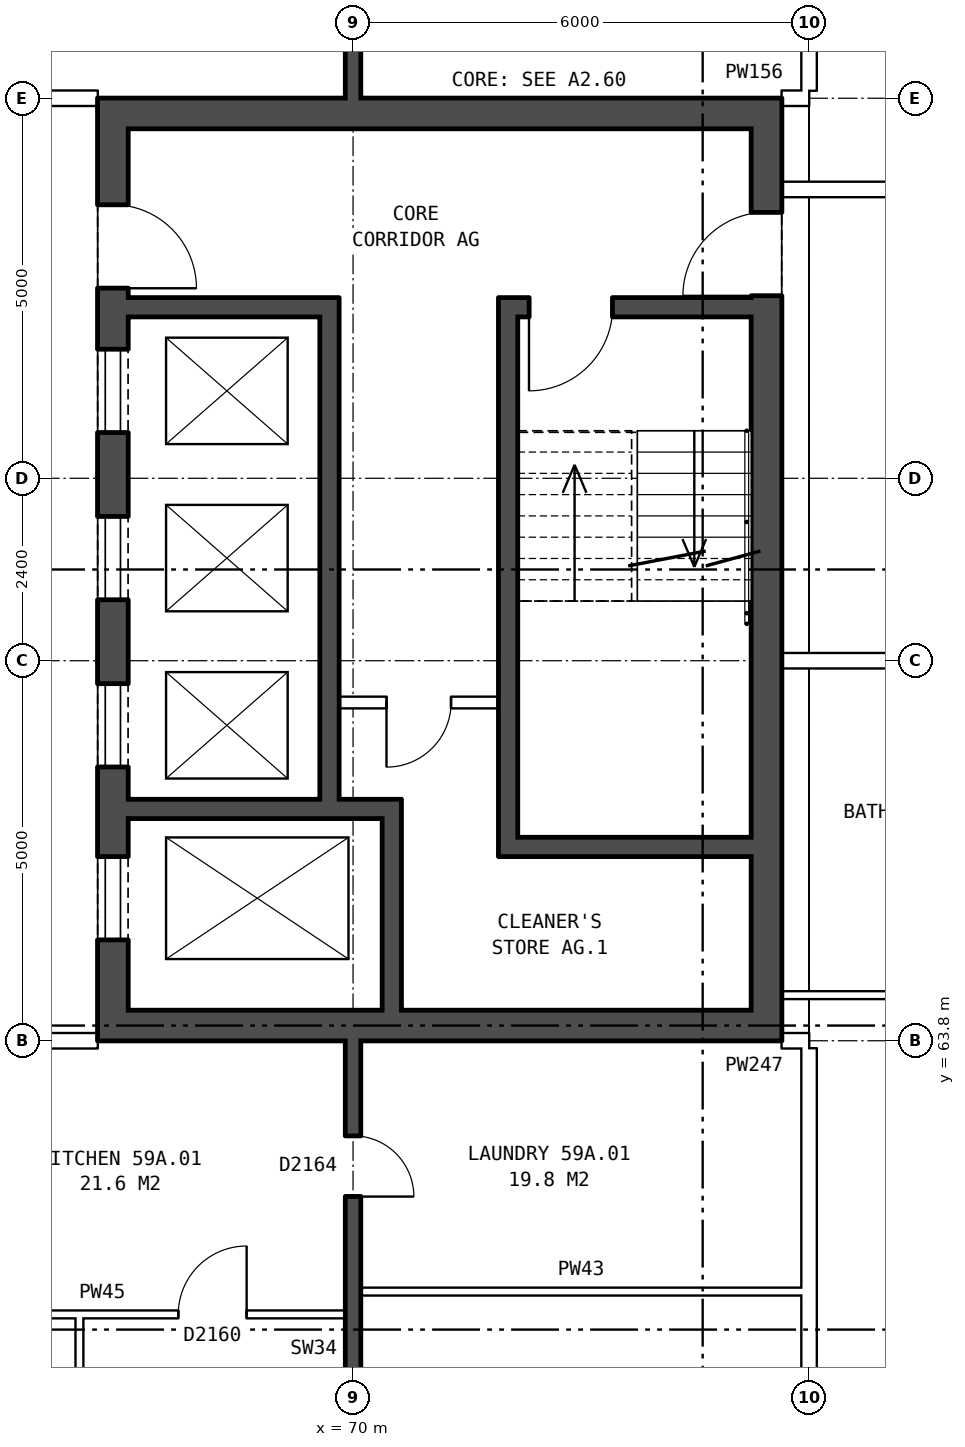
"""IFC4 building model, lengths in metres.
Left out: names, types, materials, properties, quantities, classifications, styles, units other than length and angle.
Written with IfcOpenShell. Run it as: python <this file> out.ifc"""

import sys

from ifc_helpers import new_model, si_unit, direction, frame, frame_2d, origin, place, context, subcontext, project, spatial, rectangle, extrude, element, fill, save


model = new_model("IFC4")
c1 = context("Model", 3, precision=1e-05, world=origin(), true_north=direction((0.0, 1.0)))
c2 = subcontext(c1, "Body", "Model", "MODEL_VIEW")
j1 = project(units=[si_unit("LENGTHUNIT", "METRE"), si_unit("PLANEANGLEUNIT", "RADIAN")], contexts=[c1])
p1 = place(None, origin())
s1 = spatial("IfcSite", under=j1, at=p1, CompositionType="ELEMENT")
p2 = place(p1, origin())
s2 = spatial("IfcBuilding", under=s1, at=p2, CompositionType="ELEMENT")
p3 = place(p2, frame((0.0, 0.0, 209.0)))
s3 = spatial("IfcBuildingStorey", under=s2, at=p3, CompositionType="ELEMENT", Elevation=209.0)
p4 = place(p3, frame((66.84, 63.8, 0.0), z_axis=(0.0, 0.0, 1.0), x_axis=(0.0, 1.0, 0.0)))
e1 = element("IfcWall", 1, at=p4, inside=s3, PredefinedType="SHEAR", context=c2, shape_type="SweptSolid", body=[
    extrude(rectangle(XDim=12.4, YDim=0.4, at=frame_2d((6.2, 0.0))), origin(), (0.0, 0.0, 1.0), 2.85),
])
p5 = place(p4, frame((1.325, 0.0, 0.0)))
e2 = element("IfcOpeningElement", 2, at=p5, cuts=e1, PredefinedType="OPENING", context=c2, shape_type="SweptSolid", body=[
    extrude(rectangle(XDim=1.1, YDim=2.1, at=frame_2d((0.55, 1.05))), frame((0.0, 0.21, 0.0), z_axis=(0.0, -1.0, 0.0), x_axis=(1.0, 0.0, 0.0)), (0.0, 0.0, 1.0), 0.42),
])
p6 = place(p4, frame((3.6, 0.0, 0.0)))
e3 = element("IfcOpeningElement", 3, at=p6, cuts=e1, PredefinedType="OPENING", context=c2, shape_type="SweptSolid", body=[
    extrude(rectangle(XDim=1.1, YDim=2.1, at=frame_2d((0.55, 1.05))), frame((0.0, 0.21, 0.0), z_axis=(0.0, -1.0, 0.0), x_axis=(1.0, 0.0, 0.0)), (0.0, 0.0, 1.0), 0.42),
])
p7 = place(p4, frame((5.8, 0.0, 0.0)))
e4 = element("IfcOpeningElement", 4, at=p7, cuts=e1, PredefinedType="OPENING", context=c2, shape_type="SweptSolid", body=[
    extrude(rectangle(XDim=1.1, YDim=2.1, at=frame_2d((0.55, 1.05))), frame((0.0, 0.21, 0.0), z_axis=(0.0, -1.0, 0.0), x_axis=(1.0, 0.0, 0.0)), (0.0, 0.0, 1.0), 0.42),
])
p8 = place(p4, frame((8.0, 0.0, 0.0)))
e5 = element("IfcOpeningElement", 5, at=p8, cuts=e1, PredefinedType="OPENING", context=c2, shape_type="SweptSolid", body=[
    extrude(rectangle(XDim=1.1, YDim=2.1, at=frame_2d((0.55, 1.05))), frame((0.0, 0.21, 0.0), z_axis=(0.0, -1.0, 0.0), x_axis=(1.0, 0.0, 0.0)), (0.0, 0.0, 1.0), 0.42),
])
p9 = place(p4, frame((9.9, 0.0, 0.0)))
e6 = element("IfcOpeningElement", 6, at=p9, cuts=e1, PredefinedType="OPENING", context=c2, shape_type="SweptSolid", body=[
    extrude(rectangle(XDim=1.1, YDim=2.1, at=frame_2d((0.55, 1.05))), frame((0.0, 0.21, 0.0), z_axis=(0.0, -1.0, 0.0), x_axis=(1.0, 0.0, 0.0)), (0.0, 0.0, 1.0), 0.42),
])
p10 = place(p3, frame((75.44, 63.8, 0.0), z_axis=(0.0, 0.0, 1.0), x_axis=(0.0, 1.0, 0.0)))
e7 = element("IfcWall", 7, at=p10, inside=s3, PredefinedType="SHEAR", context=c2, shape_type="SweptSolid", body=[
    extrude(rectangle(XDim=12.4, YDim=0.4, at=frame_2d((6.2, 0.0))), origin(), (0.0, 0.0, 1.0), 2.85),
])
p11 = place(p10, frame((9.8, 0.0, 0.0)))
e8 = element("IfcOpeningElement", 8, at=p11, cuts=e7, PredefinedType="OPENING", context=c2, shape_type="SweptSolid", body=[
    extrude(rectangle(XDim=1.1, YDim=2.1, at=frame_2d((0.55, 1.05))), frame((0.0, 0.21, 0.0), z_axis=(0.0, -1.0, 0.0), x_axis=(1.0, 0.0, 0.0)), (0.0, 0.0, 1.0), 0.42),
])
for number, where, z_axis, x_axis in (
    (9, (67.04, 64.0, 0.0), (0.0, 0.0, 1.0), (1.0, 0.0, 0.0)),
    (10, (67.04, 76.0, 0.0), (0.0, 0.0, 1.0), (1.0, 0.0, 0.0)),
):
    element("IfcWall", number, at=place(p3, frame(where, z_axis=z_axis, x_axis=x_axis)), inside=s3, PredefinedType="SHEAR", context=c2, shape_type="SweptSolid", body=[
        extrude(rectangle(XDim=8.2, YDim=0.4, at=frame_2d((4.1, 0.0))), origin(), (0.0, 0.0, 1.0), 2.85),
    ])
p12 = place(p3, frame((72.165, 66.35, 0.0), z_axis=(0.0, 0.0, 1.0), x_axis=(1.0, 0.0, 0.0)))
e11 = element("IfcWall", 11, at=p12, inside=s3, PredefinedType="SHEAR", context=c2, shape_type="SweptSolid", body=[
    extrude(rectangle(XDim=3.075, YDim=0.25, at=frame_2d((1.538, 0.0))), origin(), (0.0, 0.0, 1.0), 2.85),
])
p13 = place(p3, frame((67.04, 66.85, 0.0), z_axis=(0.0, 0.0, 1.0), x_axis=(1.0, 0.0, 0.0)))
e12 = element("IfcWall", 12, at=p13, inside=s3, PredefinedType="SHEAR", context=c2, shape_type="SweptSolid", body=[
    extrude(rectangle(XDim=3.595, YDim=0.25, at=frame_2d((1.797, 0.0))), origin(), (0.0, 0.0, 1.0), 2.85),
])
p14 = place(p3, frame((69.815, 68.25, 0.0), z_axis=(0.0, 0.0, 1.0), x_axis=(1.0, 0.0, 0.0)))
e13 = element("IfcWall", 13, at=p14, inside=s3, PredefinedType="PARTITIONING", context=c2, shape_type="SweptSolid", body=[
    extrude(rectangle(XDim=2.1, YDim=0.15, at=frame_2d((1.05, 0.0))), origin(), (0.0, 0.0, 1.0), 2.85),
])
p15 = place(p14, frame((0.625, 0.0, 0.0)))
e14 = element("IfcOpeningElement", 14, at=p15, cuts=e13, PredefinedType="OPENING", context=c2, shape_type="SweptSolid", body=[
    extrude(rectangle(XDim=0.85, YDim=2.1, at=frame_2d((0.425, 1.05))), frame((0.0, 0.085, 0.0), z_axis=(0.0, -1.0, 0.0), x_axis=(1.0, 0.0, 0.0)), (0.0, 0.0, 1.0), 0.17),
])
p16 = place(p3, frame((67.04, 73.45, 0.0), z_axis=(0.0, 0.0, 1.0), x_axis=(1.0, 0.0, 0.0)))
e15 = element("IfcWall", 15, at=p16, inside=s3, PredefinedType="SHEAR", context=c2, shape_type="SweptSolid", body=[
    extrude(rectangle(XDim=2.525, YDim=0.25, at=frame_2d((1.262, 0.0))), origin(), (0.0, 0.0, 1.0), 2.85),
])
p17 = place(p3, frame((72.165, 73.45, 0.0), z_axis=(0.0, 0.0, 1.0), x_axis=(1.0, 0.0, 0.0)))
e16 = element("IfcWall", 16, at=p17, inside=s3, PredefinedType="SHEAR", context=c2, shape_type="SweptSolid", body=[
    extrude(rectangle(XDim=3.075, YDim=0.25, at=frame_2d((1.538, 0.0))), origin(), (0.0, 0.0, 1.0), 2.85),
])
p18 = place(p17, frame((0.15, 0.0, 0.0)))
e17 = element("IfcOpeningElement", 17, at=p18, cuts=e16, PredefinedType="OPENING", context=c2, shape_type="SweptSolid", body=[
    extrude(rectangle(XDim=1.1, YDim=2.1, at=frame_2d((0.55, 1.05))), frame((0.0, 0.135, 0.0), z_axis=(0.0, -1.0, 0.0), x_axis=(1.0, 0.0, 0.0)), (0.0, 0.0, 1.0), 0.27),
])
p19 = place(p3, frame((69.69, 66.975, 0.0), z_axis=(0.0, 0.0, 1.0), x_axis=(0.0, 1.0, 0.0)))
e18 = element("IfcWall", 18, at=p19, inside=s3, PredefinedType="SHEAR", context=c2, shape_type="SweptSolid", body=[
    extrude(rectangle(XDim=6.6, YDim=0.25, at=frame_2d((3.3, 0.0))), origin(), (0.0, 0.0, 1.0), 2.85),
])
p20 = place(p3, frame((70.51, 64.2, 0.0), z_axis=(0.0, 0.0, 1.0), x_axis=(0.0, 1.0, 0.0)))
e19 = element("IfcWall", 19, at=p20, inside=s3, PredefinedType="SHEAR", context=c2, shape_type="SweptSolid", body=[
    extrude(rectangle(XDim=2.525, YDim=0.25, at=frame_2d((1.263, 0.0))), origin(), (0.0, 0.0, 1.0), 2.85),
])
p21 = place(p3, frame((72.04, 66.225, 0.0), z_axis=(0.0, 0.0, 1.0), x_axis=(0.0, 1.0, 0.0)))
e20 = element("IfcWall", 20, at=p21, inside=s3, PredefinedType="SHEAR", context=c2, shape_type="SweptSolid", body=[
    extrude(rectangle(XDim=7.35, YDim=0.25, at=frame_2d((3.675, 0.0))), origin(), (0.0, 0.0, 1.0), 2.85),
])
p22 = place(p3, frame((64.1, 60.2, 0.0), z_axis=(0.0, 0.0, 1.0), x_axis=(1.0, 0.0, 0.0)))
e21 = element("IfcWall", 21, at=p22, inside=s3, PredefinedType="PARTITIONING", context=c2, shape_type="SweptSolid", body=[
    extrude(rectangle(XDim=5.8, YDim=0.1, at=frame_2d((2.9, 0.0))), origin(), (0.0, 0.0, 1.0), 2.85),
])
p23 = place(p22, frame((3.6, 0.0, 0.0)))
e22 = element("IfcOpeningElement", 22, at=p23, cuts=e21, PredefinedType="OPENING", context=c2, shape_type="SweptSolid", body=[
    extrude(rectangle(XDim=0.9, YDim=2.1, at=frame_2d((0.45, 1.05))), frame((0.0, 0.06, 0.0), z_axis=(0.0, -1.0, 0.0), x_axis=(1.0, 0.0, 0.0)), (0.0, 0.0, 1.0), 0.12),
])
p24 = place(p22, frame((0.7, 0.0, 0.0)))
e23 = element("IfcOpeningElement", 23, at=p24, cuts=e21, PredefinedType="OPENING", context=c2, shape_type="SweptSolid", body=[
    extrude(rectangle(XDim=0.9, YDim=2.1, at=frame_2d((0.45, 1.05))), frame((0.0, 0.06, 0.0), z_axis=(0.0, -1.0, 0.0), x_axis=(1.0, 0.0, 0.0)), (0.0, 0.0, 1.0), 0.12),
])
p25 = place(p3, frame((70.1, 60.5, 0.0), z_axis=(0.0, 0.0, 1.0), x_axis=(1.0, 0.0, 0.0)))
e24 = element("IfcWall", 24, at=p25, inside=s3, PredefinedType="PARTITIONING", context=c2, shape_type="SweptSolid", body=[
    extrude(rectangle(XDim=5.8, YDim=0.1, at=frame_2d((2.9, 0.0))), origin(), (0.0, 0.0, 1.0), 2.85),
])
p26 = place(p3, frame((63.64, 63.8, 0.0), z_axis=(0.0, 0.0, 1.0), x_axis=(1.0, 0.0, 0.0)))
e25 = element("IfcWall", 25, at=p26, inside=s3, PredefinedType="PARTITIONING", context=c2, shape_type="SweptSolid", body=[
    extrude(rectangle(XDim=3.0, YDim=0.2, at=frame_2d((1.5, 0.0))), origin(), (0.0, 0.0, 1.0), 2.85),
])
p27 = place(p26, frame((1.18, 0.0, 0.0)))
e26 = element("IfcOpeningElement", 26, at=p27, cuts=e25, PredefinedType="OPENING", context=c2, shape_type="SweptSolid", body=[
    extrude(rectangle(XDim=1.0, YDim=2.1, at=frame_2d((0.5, 1.05))), frame((0.0, 0.11, 0.0), z_axis=(0.0, -1.0, 0.0), x_axis=(1.0, 0.0, 0.0)), (0.0, 0.0, 1.0), 0.22),
])
p28 = place(p3, frame((75.64, 63.8, 0.0), z_axis=(0.0, 0.0, 1.0), x_axis=(1.0, 0.0, 0.0)))
e27 = element("IfcWall", 27, at=p28, inside=s3, PredefinedType="PARTITIONING", context=c2, shape_type="SweptSolid", body=[
    extrude(rectangle(XDim=0.36, YDim=0.2, at=frame_2d((0.18, 0.0))), origin(), (0.0, 0.0, 1.0), 2.85),
])
p29 = place(p3, frame((75.64, 64.4, 0.0), z_axis=(0.0, 0.0, 1.0), x_axis=(1.0, 0.0, 0.0)))
e28 = element("IfcWall", 28, at=p29, inside=s3, PredefinedType="PARTITIONING", context=c2, shape_type="SweptSolid", body=[
    extrude(rectangle(XDim=3.798, YDim=0.1, at=frame_2d((1.899, 0.0))), origin(), (0.0, 0.0, 1.0), 2.85),
])
p30 = place(p3, frame((75.64, 68.8, 0.0), z_axis=(0.0, 0.0, 1.0), x_axis=(1.0, 0.0, 0.0)))
e29 = element("IfcWall", 29, at=p30, inside=s3, PredefinedType="PARTITIONING", context=c2, shape_type="SweptSolid", body=[
    extrude(rectangle(XDim=55.72, YDim=0.2, at=frame_2d((27.86, 0.0))), origin(), (0.0, 0.0, 1.0), 2.85),
])
p31 = place(p30, frame((5.191, 0.0, 0.0)))
e30 = element("IfcOpeningElement", 30, at=p31, cuts=e29, PredefinedType="OPENING", context=c2, shape_type="SweptSolid", body=[
    extrude(rectangle(XDim=1.0, YDim=2.1, at=frame_2d((0.5, 1.05))), frame((0.0, 0.11, 0.0), z_axis=(0.0, -1.0, 0.0), x_axis=(1.0, 0.0, 0.0)), (0.0, 0.0, 1.0), 0.22),
])
p32 = place(p30, frame((15.678, 0.0, 0.0)))
e31 = element("IfcOpeningElement", 31, at=p32, cuts=e29, PredefinedType="OPENING", context=c2, shape_type="SweptSolid", body=[
    extrude(rectangle(XDim=1.0, YDim=2.1, at=frame_2d((0.5, 1.05))), frame((0.0, 0.11, 0.0), z_axis=(0.0, -1.0, 0.0), x_axis=(1.0, 0.0, 0.0)), (0.0, 0.0, 1.0), 0.22),
])
p33 = place(p30, frame((22.553, 0.0, 0.0)))
e32 = element("IfcOpeningElement", 32, at=p33, cuts=e29, PredefinedType="OPENING", context=c2, shape_type="SweptSolid", body=[
    extrude(rectangle(XDim=1.0, YDim=2.1, at=frame_2d((0.5, 1.05))), frame((0.0, 0.11, 0.0), z_axis=(0.0, -1.0, 0.0), x_axis=(1.0, 0.0, 0.0)), (0.0, 0.0, 1.0), 0.22),
])
p34 = place(p30, frame((32.866, 0.0, 0.0)))
e33 = element("IfcOpeningElement", 33, at=p34, cuts=e29, PredefinedType="OPENING", context=c2, shape_type="SweptSolid", body=[
    extrude(rectangle(XDim=1.0, YDim=2.1, at=frame_2d((0.5, 1.05))), frame((0.0, 0.11, 0.0), z_axis=(0.0, -1.0, 0.0), x_axis=(1.0, 0.0, 0.0)), (0.0, 0.0, 1.0), 0.22),
])
p35 = place(p30, frame((43.178, 0.0, 0.0)))
e34 = element("IfcOpeningElement", 34, at=p35, cuts=e29, PredefinedType="OPENING", context=c2, shape_type="SweptSolid", body=[
    extrude(rectangle(XDim=1.0, YDim=2.1, at=frame_2d((0.5, 1.05))), frame((0.0, 0.11, 0.0), z_axis=(0.0, -1.0, 0.0), x_axis=(1.0, 0.0, 0.0)), (0.0, 0.0, 1.0), 0.22),
])
p36 = place(p30, frame((50.053, 0.0, 0.0)))
e35 = element("IfcOpeningElement", 35, at=p36, cuts=e29, PredefinedType="OPENING", context=c2, shape_type="SweptSolid", body=[
    extrude(rectangle(XDim=1.0, YDim=2.1, at=frame_2d((0.5, 1.05))), frame((0.0, 0.11, 0.0), z_axis=(0.0, -1.0, 0.0), x_axis=(1.0, 0.0, 0.0)), (0.0, 0.0, 1.0), 0.22),
])
p37 = place(p3, frame((75.64, 75.0, 0.0), z_axis=(0.0, 0.0, 1.0), x_axis=(1.0, 0.0, 0.0)))
e36 = element("IfcWall", 36, at=p37, inside=s3, PredefinedType="PARTITIONING", context=c2, shape_type="SweptSolid", body=[
    extrude(rectangle(XDim=7.585, YDim=0.2, at=frame_2d((3.792, 0.0))), origin(), (0.0, 0.0, 1.0), 2.85),
])
p38 = place(p37, frame((3.343, 0.0, 0.0)))
e37 = element("IfcOpeningElement", 37, at=p38, cuts=e36, PredefinedType="OPENING", context=c2, shape_type="SweptSolid", body=[
    extrude(rectangle(XDim=0.9, YDim=2.1, at=frame_2d((0.45, 1.05))), frame((0.0, 0.11, 0.0), z_axis=(0.0, -1.0, 0.0), x_axis=(1.0, 0.0, 0.0)), (0.0, 0.0, 1.0), 0.22),
])
p39 = place(p3, frame((63.64, 76.2, 0.0), z_axis=(0.0, 0.0, 1.0), x_axis=(1.0, 0.0, 0.0)))
e38 = element("IfcWall", 38, at=p39, inside=s3, PredefinedType="PARTITIONING", context=c2, shape_type="SweptSolid", body=[
    extrude(rectangle(XDim=3.0, YDim=0.2, at=frame_2d((1.5, 0.0))), origin(), (0.0, 0.0, 1.0), 2.85),
])
p40 = place(p39, frame((1.18, 0.0, 0.0)))
e39 = element("IfcOpeningElement", 39, at=p40, cuts=e38, PredefinedType="OPENING", context=c2, shape_type="SweptSolid", body=[
    extrude(rectangle(XDim=1.0, YDim=2.1, at=frame_2d((0.5, 1.05))), frame((0.0, 0.11, 0.0), z_axis=(0.0, -1.0, 0.0), x_axis=(1.0, 0.0, 0.0)), (0.0, 0.0, 1.0), 0.22),
])
p41 = place(p3, frame((75.64, 76.2, 0.0), z_axis=(0.0, 0.0, 1.0), x_axis=(1.0, 0.0, 0.0)))
e40 = element("IfcWall", 40, at=p41, inside=s3, PredefinedType="PARTITIONING", context=c2, shape_type="SweptSolid", body=[
    extrude(rectangle(XDim=0.36, YDim=0.2, at=frame_2d((0.18, 0.0))), origin(), (0.0, 0.0, 1.0), 2.85),
])
p42 = place(p3, frame((66.4, 57.85, 0.0), z_axis=(0.0, 0.0, 1.0), x_axis=(0.0, 1.0, 0.0)))
e41 = element("IfcWall", 41, at=p42, inside=s3, PredefinedType="PARTITIONING", context=c2, shape_type="SweptSolid", body=[
    extrude(rectangle(XDim=2.3, YDim=0.1, at=frame_2d((1.15, 0.0))), origin(), (0.0, 0.0, 1.0), 2.85),
])
p43 = place(p3, frame((70.0, 54.36, 0.0), z_axis=(0.0, 0.0, 1.0), x_axis=(0.0, 1.0, 0.0)))
e42 = element("IfcWall", 42, at=p43, inside=s3, PredefinedType="SOLIDWALL", context=c2, shape_type="SweptSolid", body=[
    extrude(rectangle(XDim=9.44, YDim=0.2, at=frame_2d((4.72, 0.0))), origin(), (0.0, 0.0, 1.0), 2.85),
])
p44 = place(p43, frame((2.47, 0.0, 0.0)))
e43 = element("IfcOpeningElement", 43, at=p44, cuts=e42, PredefinedType="OPENING", context=c2, shape_type="SweptSolid", body=[
    extrude(rectangle(XDim=0.9, YDim=2.1, at=frame_2d((0.45, 1.05))), frame((0.0, 0.11, 0.0), z_axis=(0.0, -1.0, 0.0), x_axis=(1.0, 0.0, 0.0)), (0.0, 0.0, 1.0), 0.22),
])
p45 = place(p43, frame((7.39, 0.0, 0.0)))
e44 = element("IfcOpeningElement", 44, at=p45, cuts=e42, PredefinedType="OPENING", context=c2, shape_type="SweptSolid", body=[
    extrude(rectangle(XDim=0.8, YDim=2.1, at=frame_2d((0.4, 1.05))), frame((0.0, 0.11, 0.0), z_axis=(0.0, -1.0, 0.0), x_axis=(1.0, 0.0, 0.0)), (0.0, 0.0, 1.0), 0.22),
])
p46 = place(p3, frame((70.0, 76.2, 0.0), z_axis=(0.0, 0.0, 1.0), x_axis=(0.0, 1.0, 0.0)))
e45 = element("IfcWall", 45, at=p46, inside=s3, PredefinedType="SOLIDWALL", context=c2, shape_type="SweptSolid", body=[
    extrude(rectangle(XDim=9.44, YDim=0.2, at=frame_2d((4.72, 0.0))), origin(), (0.0, 0.0, 1.0), 2.85),
])
p47 = place(p46, frame((6.22, 0.0, 0.0)))
e46 = element("IfcOpeningElement", 46, at=p47, cuts=e45, PredefinedType="OPENING", context=c2, shape_type="SweptSolid", body=[
    extrude(rectangle(XDim=0.9, YDim=2.1, at=frame_2d((0.45, 1.05))), frame((0.0, 0.11, 0.0), z_axis=(0.0, -1.0, 0.0), x_axis=(1.0, 0.0, 0.0)), (0.0, 0.0, 1.0), 0.22),
])
p48 = place(p46, frame((1.25, 0.0, 0.0)))
e47 = element("IfcOpeningElement", 47, at=p48, cuts=e45, PredefinedType="OPENING", context=c2, shape_type="SweptSolid", body=[
    extrude(rectangle(XDim=0.8, YDim=2.1, at=frame_2d((0.4, 1.05))), frame((0.0, 0.11, 0.0), z_axis=(0.0, -1.0, 0.0), x_axis=(1.0, 0.0, 0.0)), (0.0, 0.0, 1.0), 0.22),
])
for number, where, z_axis, x_axis in (
    (48, (76.0, 54.36, 0.0), (0.0, 0.0, 1.0), (0.0, 1.0, 0.0)),
    (49, (76.0, 76.3, 0.0), (0.0, 0.0, 1.0), (0.0, 1.0, 0.0)),
):
    element("IfcWall", number, at=place(p3, frame(where, z_axis=z_axis, x_axis=x_axis)), inside=s3, PredefinedType="PARTITIONING", context=c2, shape_type="SweptSolid", body=[
        extrude(rectangle(XDim=9.34, YDim=0.2, at=frame_2d((4.67, 0.0))), origin(), (0.0, 0.0, 1.0), 2.85),
    ])
p49 = place(p5, origin())
e50 = element("IfcDoor", 50, at=p49, inside=s3, OperationType="DOUBLE_DOOR_SLIDING", PredefinedType="DOOR", context=c2, shape_type="SweptSolid", body=[
    extrude(rectangle(XDim=1.1, YDim=2.1, at=frame_2d((0.55, 1.05))), frame((0.0, -0.135, 0.0), z_axis=(0.0, -1.0, 0.0), x_axis=(1.0, 0.0, 0.0)), (0.0, 0.0, 1.0), 0.05),
])
fill(e2, e50)
p50 = place(p6, origin())
e51 = element("IfcDoor", 51, at=p50, inside=s3, OperationType="DOUBLE_DOOR_SLIDING", PredefinedType="DOOR", context=c2, shape_type="SweptSolid", body=[
    extrude(rectangle(XDim=1.1, YDim=2.1, at=frame_2d((0.55, 1.05))), frame((0.0, -0.135, 0.0), z_axis=(0.0, -1.0, 0.0), x_axis=(1.0, 0.0, 0.0)), (0.0, 0.0, 1.0), 0.05),
])
fill(e3, e51)
p51 = place(p7, origin())
e52 = element("IfcDoor", 52, at=p51, inside=s3, OperationType="DOUBLE_DOOR_SLIDING", PredefinedType="DOOR", context=c2, shape_type="SweptSolid", body=[
    extrude(rectangle(XDim=1.1, YDim=2.1, at=frame_2d((0.55, 1.05))), frame((0.0, -0.135, 0.0), z_axis=(0.0, -1.0, 0.0), x_axis=(1.0, 0.0, 0.0)), (0.0, 0.0, 1.0), 0.05),
])
fill(e4, e52)
p52 = place(p8, origin())
e53 = element("IfcDoor", 53, at=p52, inside=s3, OperationType="DOUBLE_DOOR_SLIDING", PredefinedType="DOOR", context=c2, shape_type="SweptSolid", body=[
    extrude(rectangle(XDim=1.1, YDim=2.1, at=frame_2d((0.55, 1.05))), frame((0.0, -0.135, 0.0), z_axis=(0.0, -1.0, 0.0), x_axis=(1.0, 0.0, 0.0)), (0.0, 0.0, 1.0), 0.05),
])
fill(e5, e53)
p53 = place(p9, frame((1.1, 0.0, 0.0), z_axis=(0.0, 0.0, 1.0), x_axis=(-1.0, 0.0, 0.0)))
e54 = element("IfcDoor", 54, at=p53, inside=s3, OperationType="SINGLE_SWING_RIGHT", PredefinedType="DOOR", context=c2, shape_type="SweptSolid", body=[
    extrude(rectangle(XDim=1.1, YDim=2.1, at=frame_2d((0.55, 1.05))), frame((0.0, 0.185, 0.0), z_axis=(0.0, -1.0, 0.0), x_axis=(1.0, 0.0, 0.0)), (0.0, 0.0, 1.0), 0.05),
])
fill(e6, e54)
p54 = place(p18, frame((1.1, 0.0, 0.0), z_axis=(0.0, 0.0, 1.0), x_axis=(-1.0, 0.0, 0.0)))
e55 = element("IfcDoor", 55, at=p54, inside=s3, OperationType="SINGLE_SWING_RIGHT", PredefinedType="DOOR", context=c2, shape_type="SweptSolid", body=[
    extrude(rectangle(XDim=1.1, YDim=2.1, at=frame_2d((0.55, 1.05))), frame((0.0, 0.025, 0.0), z_axis=(0.0, -1.0, 0.0), x_axis=(1.0, 0.0, 0.0)), (0.0, 0.0, 1.0), 0.05),
])
fill(e17, e55)
p55 = place(p15, frame((0.85, 0.0, 0.0), z_axis=(0.0, 0.0, 1.0), x_axis=(-1.0, 0.0, 0.0)))
e56 = element("IfcDoor", 56, at=p55, inside=s3, OperationType="SINGLE_SWING_RIGHT", PredefinedType="DOOR", context=c2, shape_type="SweptSolid", body=[
    extrude(rectangle(XDim=0.85, YDim=2.1, at=frame_2d((0.425, 1.05))), frame((0.0, 0.025, 0.0), z_axis=(0.0, -1.0, 0.0), x_axis=(1.0, 0.0, 0.0)), (0.0, 0.0, 1.0), 0.05),
])
fill(e14, e56)
p56 = place(p11, origin())
e57 = element("IfcDoor", 57, at=p56, inside=s3, OperationType="SINGLE_SWING_LEFT", PredefinedType="DOOR", context=c2, shape_type="SweptSolid", body=[
    extrude(rectangle(XDim=1.1, YDim=2.1, at=frame_2d((0.55, 1.05))), frame((0.0, 0.185, 0.0), z_axis=(0.0, -1.0, 0.0), x_axis=(1.0, 0.0, 0.0)), (0.0, 0.0, 1.0), 0.05),
])
fill(e8, e57)
p57 = place(p23, origin())
e58 = element("IfcDoor", 58, at=p57, inside=s3, OperationType="SINGLE_SWING_RIGHT", PredefinedType="DOOR", context=c2, shape_type="SweptSolid", body=[
    extrude(rectangle(XDim=0.9, YDim=2.1, at=frame_2d((0.45, 1.05))), frame((0.0, 0.025, 0.0), z_axis=(0.0, -1.0, 0.0), x_axis=(1.0, 0.0, 0.0)), (0.0, 0.0, 1.0), 0.05),
])
fill(e22, e58)
p58 = place(p45, frame((0.8, 0.0, 0.0), z_axis=(0.0, 0.0, 1.0), x_axis=(-1.0, 0.0, 0.0)))
e59 = element("IfcDoor", 59, at=p58, inside=s3, OperationType="SINGLE_SWING_RIGHT", PredefinedType="DOOR", context=c2, shape_type="SweptSolid", body=[
    extrude(rectangle(XDim=0.8, YDim=2.1, at=frame_2d((0.4, 1.05))), frame((0.0, 0.025, 0.0), z_axis=(0.0, -1.0, 0.0), x_axis=(1.0, 0.0, 0.0)), (0.0, 0.0, 1.0), 0.05),
])
fill(e44, e59)
save(model, sys.argv[1])
